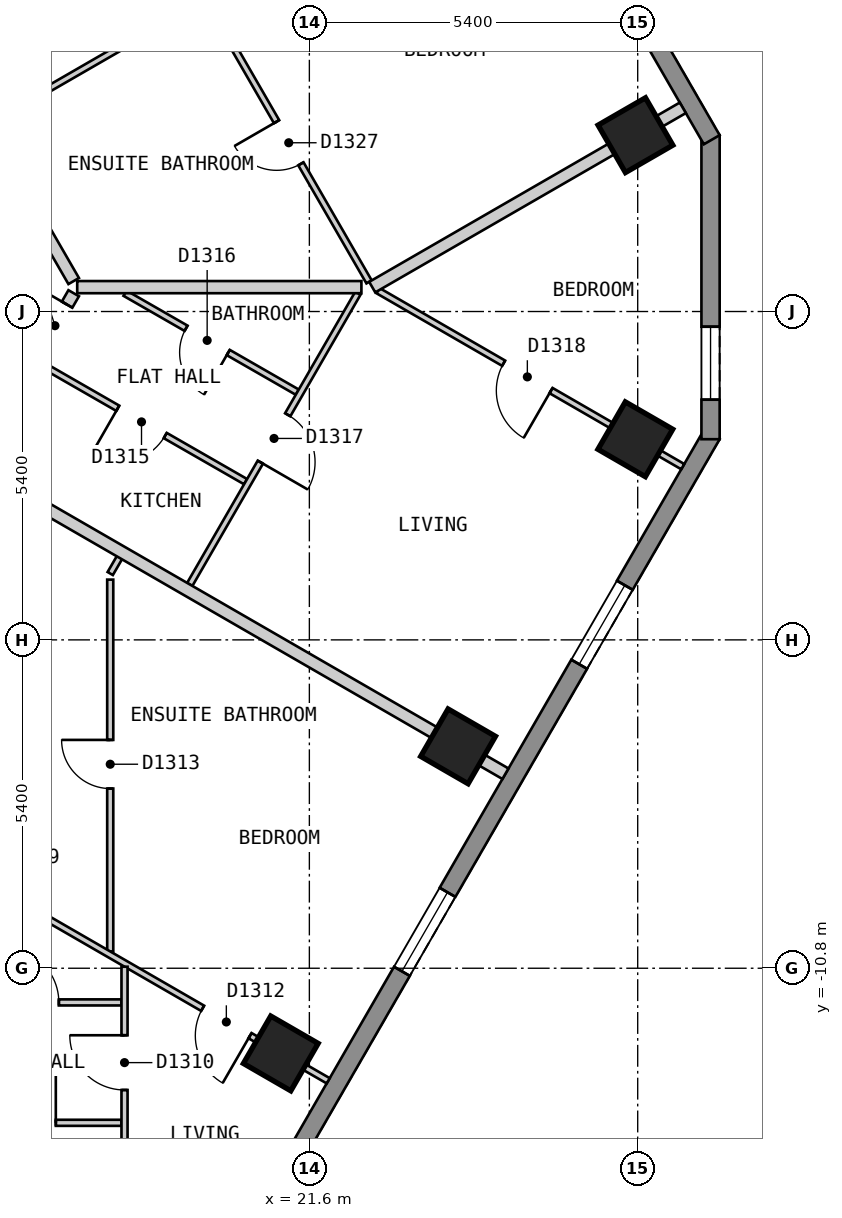
"""IFC4 building model, lengths in metres.
Left out: names, types, materials, properties, quantities, classifications, styles, units other than length and angle.
Written with IfcOpenShell. Run it as: python <this file> out.ifc"""

import sys

from ifc_helpers import new_model, si_unit, direction, frame, frame_2d, origin, origin_2d, place, context, subcontext, project, spatial, polyline, rectangle, outline, extrude, element, fill, save


model = new_model("IFC4")
c1 = context("Model", 3, precision=1e-05, world=origin(), true_north=direction((0.0, 1.0)))
c2 = subcontext(c1, "Body", "Model", "MODEL_VIEW")
j1 = project(units=[si_unit("LENGTHUNIT", "METRE"), si_unit("PLANEANGLEUNIT", "RADIAN")], contexts=[c1])
p1 = place(None, origin())
s1 = spatial("IfcSite", under=j1, at=p1, CompositionType="ELEMENT")
p2 = place(p1, origin())
s2 = spatial("IfcBuilding", under=s1, at=p2, CompositionType="ELEMENT")
p3 = place(p2, frame((0.0, 0.0, 135.6)))
s3 = spatial("IfcBuildingStorey", under=s2, at=p3, CompositionType="ELEMENT", Elevation=135.6)
for number, where, z_axis, x_axis in (
    (1, (21.13, -12.201, 0.0), (0.0, 0.0, 1.0), (0.5, 0.866, 0.0)),
    (2, (24.046, -7.151, 0.0), (0.0, 0.0, 1.0), (0.5, 0.866, 0.0)),
    (3, (26.961, -2.101, 0.0), (0.0, 0.0, 1.0), (0.5, 0.866, 0.0)),
    (4, (26.963, 2.9, 0.0), (0.0, 0.0, 1.0), (-0.5, 0.866, 0.0)),
):
    element("IfcColumn", number, at=place(p3, frame(where, z_axis=z_axis, x_axis=x_axis)), inside=s3, PredefinedType="COLUMN", context=c2, shape_type="SweptSolid", body=[
        extrude(rectangle(XDim=0.9, YDim=0.9, at=origin_2d()), origin(), (0.0, 0.0, 1.0), 3.0),
    ])
p4 = place(p3, frame((15.862, -23.425, 0.0), z_axis=(0.0, 0.0, 1.0), x_axis=(0.500017503135, 0.866015298109, 0.0)))
e5 = element("IfcWall", 5, at=p4, inside=s3, PredefinedType="SOLIDWALL", context=c2, shape_type="SweptSolid", body=[
    extrude(outline(polyline([(0.0, -0.15), (24.711, -0.15), (24.631, 0.15), (0.08, 0.15), (0.0, -0.15)])), origin(), (0.0, 0.0, 1.0), 2.7),
])
p5 = place(p4, frame((2.857, 0.0, 0.15)))
e6 = element("IfcOpeningElement", 6, at=p5, cuts=e5, PredefinedType="OPENING", context=c2, shape_type="SweptSolid", body=[
    extrude(rectangle(XDim=1.5, YDim=2.1, at=frame_2d((0.75, 1.05))), frame((0.0, 0.16, 0.0), z_axis=(0.0, -1.0, 0.0), x_axis=(1.0, 0.0, 0.0)), (0.0, 0.0, 1.0), 0.32),
])
p6 = place(p4, frame((8.689, 0.0, 0.15)))
e7 = element("IfcOpeningElement", 7, at=p6, cuts=e5, PredefinedType="OPENING", context=c2, shape_type="SweptSolid", body=[
    extrude(rectangle(XDim=1.5, YDim=2.1, at=frame_2d((0.75, 1.05))), frame((0.0, 0.16, 0.0), z_axis=(0.0, -1.0, 0.0), x_axis=(1.0, 0.0, 0.0)), (0.0, 0.0, 1.0), 0.32),
])
p7 = place(p4, frame((14.52, 0.0, 0.15)))
e8 = element("IfcOpeningElement", 8, at=p7, cuts=e5, PredefinedType="OPENING", context=c2, shape_type="SweptSolid", body=[
    extrude(rectangle(XDim=1.5, YDim=2.1, at=frame_2d((0.75, 1.05))), frame((0.0, 0.16, 0.0), z_axis=(0.0, -1.0, 0.0), x_axis=(1.0, 0.0, 0.0)), (0.0, 0.0, 1.0), 0.32),
])
p8 = place(p4, frame((20.351, 0.0, 0.15)))
e9 = element("IfcOpeningElement", 9, at=p8, cuts=e5, PredefinedType="OPENING", context=c2, shape_type="SweptSolid", body=[
    extrude(rectangle(XDim=1.5, YDim=2.1, at=frame_2d((0.75, 1.05))), frame((0.0, 0.16, 0.0), z_axis=(0.0, -1.0, 0.0), x_axis=(1.0, 0.0, 0.0)), (0.0, 0.0, 1.0), 0.32),
])
p9 = place(p3, frame((28.198, -2.1, 0.0), z_axis=(0.0, 0.0, 1.0), x_axis=(0.0, 1.0, 0.0)))
e10 = element("IfcWall", 10, at=p9, inside=s3, PredefinedType="SOLIDWALL", context=c2, shape_type="SweptSolid", body=[
    extrude(outline(polyline([(0.0, -0.15), (5.0, -0.15), (4.92, 0.15), (0.08, 0.15), (0.0, -0.15)])), origin(), (0.0, 0.0, 1.0), 2.7),
])
p10 = place(p9, frame((0.65, 0.0, 0.15)))
e11 = element("IfcOpeningElement", 11, at=p10, cuts=e10, PredefinedType="OPENING", context=c2, shape_type="SweptSolid", body=[
    extrude(rectangle(XDim=1.2, YDim=2.1, at=frame_2d((0.6, 1.05))), frame((0.0, 0.16, 0.0), z_axis=(0.0, -1.0, 0.0), x_axis=(1.0, 0.0, 0.0)), (0.0, 0.0, 1.0), 0.32),
])
p11 = place(p3, frame((28.218, 2.825, 0.0), z_axis=(0.0, 0.0, 1.0), x_axis=(-0.500020536353, 0.866013546791, 0.0)))
e12 = element("IfcWall", 12, at=p11, inside=s3, PredefinedType="SOLIDWALL", context=c2, shape_type="SweptSolid", body=[
    extrude(outline(polyline([(0.0, -0.15), (23.325, -0.15), (23.245, 0.15), (0.08, 0.15), (0.0, -0.15)])), origin(), (0.0, 0.0, 1.0), 2.7),
])
p12 = place(p11, frame((2.685, 0.0, 0.15)))
e13 = element("IfcOpeningElement", 13, at=p12, cuts=e12, PredefinedType="OPENING", context=c2, shape_type="SweptSolid", body=[
    extrude(rectangle(XDim=1.5, YDim=2.1, at=frame_2d((0.75, 1.05))), frame((0.0, 0.16, 0.0), z_axis=(0.0, -1.0, 0.0), x_axis=(1.0, 0.0, 0.0)), (0.0, 0.0, 1.0), 0.32),
])
p13 = place(p11, frame((8.17, 0.0, 0.15)))
e14 = element("IfcOpeningElement", 14, at=p13, cuts=e12, PredefinedType="OPENING", context=c2, shape_type="SweptSolid", body=[
    extrude(rectangle(XDim=1.5, YDim=2.1, at=frame_2d((0.75, 1.05))), frame((0.0, 0.16, 0.0), z_axis=(0.0, -1.0, 0.0), x_axis=(1.0, 0.0, 0.0)), (0.0, 0.0, 1.0), 0.32),
])
p14 = place(p11, frame((13.655, 0.0, 0.15)))
e15 = element("IfcOpeningElement", 15, at=p14, cuts=e12, PredefinedType="OPENING", context=c2, shape_type="SweptSolid", body=[
    extrude(rectangle(XDim=1.5, YDim=2.1, at=frame_2d((0.75, 1.05))), frame((0.0, 0.16, 0.0), z_axis=(0.0, -1.0, 0.0), x_axis=(1.0, 0.0, 0.0)), (0.0, 0.0, 1.0), 0.32),
])
p15 = place(p11, frame((19.14, 0.0, 0.15)))
e16 = element("IfcOpeningElement", 16, at=p15, cuts=e12, PredefinedType="OPENING", context=c2, shape_type="SweptSolid", body=[
    extrude(rectangle(XDim=1.5, YDim=2.1, at=frame_2d((0.75, 1.05))), frame((0.0, 0.16, 0.0), z_axis=(0.0, -1.0, 0.0), x_axis=(1.0, 0.0, 0.0)), (0.0, 0.0, 1.0), 0.32),
])
p16 = place(p3, frame((9.296, 15.1, 0.0), z_axis=(0.0, 0.0, 1.0), x_axis=(0.499974024244, -0.866040400375, 0.0)))
e17 = element("IfcWall", 17, at=p16, inside=s3, PredefinedType="PARTITIONING", context=c2, shape_type="SweptSolid", body=[
    extrude(rectangle(XDim=16.857, YDim=0.2, at=frame_2d((8.429, 0.0))), origin(), (0.0, 0.0, 1.0), 2.7),
])
p17 = place(p16, frame((5.209, 0.0, 0.0)))
e18 = element("IfcOpeningElement", 18, at=p17, cuts=e17, PredefinedType="OPENING", context=c2, shape_type="SweptSolid", body=[
    extrude(rectangle(XDim=1.0, YDim=2.1, at=frame_2d((0.5, 1.05))), frame((0.0, 0.11, 0.0), z_axis=(0.0, -1.0, 0.0), x_axis=(1.0, 0.0, 0.0)), (0.0, 0.0, 1.0), 0.22),
])
p18 = place(p3, frame((15.5, -3.552, 0.0), z_axis=(0.0, 0.0, 1.0), x_axis=(0.499928303779, 0.86606679366, 0.0)))
e19 = element("IfcWall", 19, at=p18, inside=s3, PredefinedType="PARTITIONING", context=c2, shape_type="SweptSolid", body=[
    extrude(rectangle(XDim=4.449, YDim=0.2, at=frame_2d((2.225, 0.0))), origin(), (0.0, 0.0, 1.0), 2.7),
])
p19 = place(p18, frame((3.432, 0.0, 0.0)))
e20 = element("IfcOpeningElement", 20, at=p19, cuts=e19, PredefinedType="OPENING", context=c2, shape_type="SweptSolid", body=[
    extrude(rectangle(XDim=0.8, YDim=2.1, at=frame_2d((0.4, 1.05))), frame((0.0, 0.11, 0.0), z_axis=(0.0, -1.0, 0.0), x_axis=(1.0, 0.0, 0.0)), (0.0, 0.0, 1.0), 0.22),
])
p20 = place(p3, frame((11.713, 19.313, 0.0), z_axis=(0.0, 0.0, 1.0), x_axis=(0.499999523185, -0.866025679073, 0.0)))
e21 = element("IfcWall", 21, at=p20, inside=s3, PredefinedType="PARTITIONING", context=c2, shape_type="SweptSolid", body=[
    extrude(rectangle(XDim=21.738, YDim=0.1, at=frame_2d((10.869, 0.0))), origin(), (0.0, 0.0, 1.0), 2.7),
])
p21 = place(p20, frame((7.654, 0.0, 0.0)))
e22 = element("IfcOpeningElement", 22, at=p21, cuts=e21, PredefinedType="OPENING", context=c2, shape_type="SweptSolid", body=[
    extrude(rectangle(XDim=0.9, YDim=2.1, at=frame_2d((0.45, 1.05))), frame((0.0, 0.06, 0.0), z_axis=(0.0, -1.0, 0.0), x_axis=(1.0, 0.0, 0.0)), (0.0, 0.0, 1.0), 0.12),
])
p22 = place(p20, frame((13.202, 0.0, 0.0)))
e23 = element("IfcOpeningElement", 23, at=p22, cuts=e21, PredefinedType="OPENING", context=c2, shape_type="SweptSolid", body=[
    extrude(rectangle(XDim=0.8, YDim=2.1, at=frame_2d((0.4, 1.05))), frame((0.0, 0.06, 0.0), z_axis=(0.0, -1.0, 0.0), x_axis=(1.0, 0.0, 0.0)), (0.0, 0.0, 1.0), 0.12),
])
p23 = place(p20, frame((2.242, 0.0, 0.0)))
e24 = element("IfcOpeningElement", 24, at=p23, cuts=e21, PredefinedType="OPENING", context=c2, shape_type="SweptSolid", body=[
    extrude(rectangle(XDim=0.8, YDim=2.1, at=frame_2d((0.4, 1.05))), frame((0.0, 0.06, 0.0), z_axis=(0.0, -1.0, 0.0), x_axis=(1.0, 0.0, 0.0)), (0.0, 0.0, 1.0), 0.12),
])
p24 = place(p20, frame((18.696, 0.0, 0.0)))
e25 = element("IfcOpeningElement", 25, at=p24, cuts=e21, PredefinedType="OPENING", context=c2, shape_type="SweptSolid", body=[
    extrude(rectangle(XDim=0.8, YDim=2.1, at=frame_2d((0.4, 1.05))), frame((0.0, 0.06, 0.0), z_axis=(0.0, -1.0, 0.0), x_axis=(1.0, 0.0, 0.0)), (0.0, 0.0, 1.0), 0.12),
])
p25 = place(p3, frame((18.325, -4.409, 0.0), z_axis=(0.0, 0.0, 1.0), x_axis=(0.0, -1.0, 0.0)))
e26 = element("IfcWall", 26, at=p25, inside=s3, PredefinedType="PARTITIONING", context=c2, shape_type="SweptSolid", body=[
    extrude(rectangle(XDim=6.115, YDim=0.1, at=frame_2d((3.058, 0.0))), origin(), (0.0, 0.0, 1.0), 2.7),
])
p26 = place(p25, frame((2.636, 0.0, 0.0)))
e27 = element("IfcOpeningElement", 27, at=p26, cuts=e26, PredefinedType="OPENING", context=c2, shape_type="SweptSolid", body=[
    extrude(rectangle(XDim=0.8, YDim=2.1, at=frame_2d((0.4, 1.05))), frame((0.0, 0.06, 0.0), z_axis=(0.0, -1.0, 0.0), x_axis=(1.0, 0.0, 0.0)), (0.0, 0.0, 1.0), 0.12),
])
p27 = place(p3, frame((15.641, -9.032, 0.0), z_axis=(0.0, 0.0, 1.0), x_axis=(0.866049104564, -0.499958946799, 0.0)))
e28 = element("IfcWall", 28, at=p27, inside=s3, PredefinedType="PARTITIONING", context=c2, shape_type="SweptSolid", body=[
    extrude(rectangle(XDim=7.238, YDim=0.1, at=frame_2d((3.619, 0.0))), origin(), (0.0, 0.0, 1.0), 2.7),
])
p28 = place(p27, frame((4.854, 0.0, 0.0)))
e29 = element("IfcOpeningElement", 29, at=p28, cuts=e28, PredefinedType="OPENING", context=c2, shape_type="SweptSolid", body=[
    extrude(rectangle(XDim=0.9, YDim=2.1, at=frame_2d((0.45, 1.05))), frame((0.0, 0.06, 0.0), z_axis=(0.0, -1.0, 0.0), x_axis=(1.0, 0.0, 0.0)), (0.0, 0.0, 1.0), 0.12),
])
p29 = place(p3, frame((17.171, -0.857, 0.0), z_axis=(0.0, 0.0, 1.0), x_axis=(0.867173455867, -0.49800622229, 0.0)))
e30 = element("IfcWall", 30, at=p29, inside=s3, PredefinedType="PARTITIONING", context=c2, shape_type="SweptSolid", body=[
    extrude(rectangle(XDim=3.898, YDim=0.1, at=frame_2d((1.949, 0.0))), origin(), (0.0, 0.0, 1.0), 2.7),
])
p30 = place(p29, frame((1.474, 0.0, 0.0)))
e31 = element("IfcOpeningElement", 31, at=p30, cuts=e30, PredefinedType="OPENING", context=c2, shape_type="SweptSolid", body=[
    extrude(rectangle(XDim=0.9, YDim=2.1, at=frame_2d((0.45, 1.05))), frame((0.0, 0.06, 0.0), z_axis=(0.0, -1.0, 0.0), x_axis=(1.0, 0.0, 0.0)), (0.0, 0.0, 1.0), 0.12),
])
p31 = place(p3, frame((18.568, 0.301, 0.0), z_axis=(0.0, 0.0, 1.0), x_axis=(0.867155675456, -0.49803718187, 0.0)))
e32 = element("IfcWall", 32, at=p31, inside=s3, PredefinedType="PARTITIONING", context=c2, shape_type="SweptSolid", body=[
    extrude(rectangle(XDim=3.267, YDim=0.1, at=frame_2d((1.633, 0.0))), origin(), (0.0, 0.0, 1.0), 2.7),
])
p32 = place(p31, frame((1.158, 0.0, 0.0)))
e33 = element("IfcOpeningElement", 33, at=p32, cuts=e32, PredefinedType="OPENING", context=c2, shape_type="SweptSolid", body=[
    extrude(rectangle(XDim=0.8, YDim=2.1, at=frame_2d((0.4, 1.05))), frame((0.0, 0.06, 0.0), z_axis=(0.0, -1.0, 0.0), x_axis=(1.0, 0.0, 0.0)), (0.0, 0.0, 1.0), 0.12),
])
p33 = place(p3, frame((22.729, 0.343, 0.0), z_axis=(0.0, 0.0, 1.0), x_axis=(0.865996608848, -0.500049870977, 0.0)))
e34 = element("IfcWall", 34, at=p33, inside=s3, PredefinedType="PARTITIONING", context=c2, shape_type="SweptSolid", body=[
    extrude(rectangle(XDim=5.788, YDim=0.1, at=frame_2d((2.894, 0.0))), origin(), (0.0, 0.0, 1.0), 2.7),
])
p34 = place(p33, frame((2.386, 0.0, 0.0)))
e35 = element("IfcOpeningElement", 35, at=p34, cuts=e34, PredefinedType="OPENING", context=c2, shape_type="SweptSolid", body=[
    extrude(rectangle(XDim=0.9, YDim=2.1, at=frame_2d((0.45, 1.05))), frame((0.0, 0.06, 0.0), z_axis=(0.0, -1.0, 0.0), x_axis=(1.0, 0.0, 0.0)), (0.0, 0.0, 1.0), 0.12),
])
p35 = place(p3, frame((15.6, -11.362, 0.0), z_axis=(0.0, 0.0, 1.0), x_axis=(1.0, 0.0, 0.0)))
e36 = element("IfcWall", 36, at=p35, inside=s3, PredefinedType="PARTITIONING", context=c2, shape_type="SweptSolid", body=[
    extrude(rectangle(XDim=2.91, YDim=0.1, at=frame_2d((1.455, 0.0))), origin(), (0.0, 0.0, 1.0), 2.7),
])
p36 = place(p35, frame((0.98, 0.0, 0.0)))
e37 = element("IfcOpeningElement", 37, at=p36, cuts=e36, PredefinedType="OPENING", context=c2, shape_type="SweptSolid", body=[
    extrude(rectangle(XDim=0.9, YDim=2.1, at=frame_2d((0.45, 1.05))), frame((0.0, 0.06, 0.0), z_axis=(0.0, -1.0, 0.0), x_axis=(1.0, 0.0, 0.0)), (0.0, 0.0, 1.0), 0.12),
])
p37 = place(p3, frame((15.6, -13.342, 0.0), z_axis=(0.0, 0.0, 1.0), x_axis=(1.0, 0.0, 0.0)))
e38 = element("IfcWall", 38, at=p37, inside=s3, PredefinedType="PARTITIONING", context=c2, shape_type="SweptSolid", body=[
    extrude(rectangle(XDim=2.91, YDim=0.1, at=frame_2d((1.455, 0.0))), origin(), (0.0, 0.0, 1.0), 2.7),
])
p38 = place(p37, frame((1.03, 0.0, 0.0)))
e39 = element("IfcOpeningElement", 39, at=p38, cuts=e38, PredefinedType="OPENING", context=c2, shape_type="SweptSolid", body=[
    extrude(rectangle(XDim=0.8, YDim=2.1, at=frame_2d((0.4, 1.05))), frame((0.0, 0.06, 0.0), z_axis=(0.0, -1.0, 0.0), x_axis=(1.0, 0.0, 0.0)), (0.0, 0.0, 1.0), 0.12),
])
p39 = place(p3, frame((18.325, -4.309, 0.0), z_axis=(0.0, 0.0, 1.0), x_axis=(0.5014706583, 0.865174652232, 0.0)))
e40 = element("IfcWall", 40, at=p39, inside=s3, PredefinedType="PARTITIONING", context=c2, shape_type="SweptSolid", body=[
    extrude(rectangle(XDim=0.399, YDim=0.1, at=frame_2d((0.199, 0.0))), origin(), (0.0, 0.0, 1.0), 2.7),
])
p40 = place(p3, frame((19.633, -4.488, 0.0), z_axis=(0.0, 0.0, 1.0), x_axis=(0.499989971015, 0.866031193944, 0.0)))
e41 = element("IfcWall", 41, at=p40, inside=s3, PredefinedType="PARTITIONING", context=c2, shape_type="SweptSolid", body=[
    extrude(rectangle(XDim=5.53, YDim=0.1, at=frame_2d((2.765, 0.0))), origin(), (0.0, 0.0, 1.0), 2.7),
])
p41 = place(p40, frame((2.322, 0.0, 0.0)))
e42 = element("IfcOpeningElement", 42, at=p41, cuts=e41, PredefinedType="OPENING", context=c2, shape_type="SweptSolid", body=[
    extrude(rectangle(XDim=0.9, YDim=2.1, at=frame_2d((0.45, 1.05))), frame((0.0, 0.06, 0.0), z_axis=(0.0, -1.0, 0.0), x_axis=(1.0, 0.0, 0.0)), (0.0, 0.0, 1.0), 0.12),
])
p42 = place(p3, frame((18.56, -15.652, 0.0), z_axis=(0.0, 0.0, 1.0), x_axis=(0.0, 1.0, 0.0)))
e43 = element("IfcWall", 43, at=p42, inside=s3, PredefinedType="PARTITIONING", context=c2, shape_type="SweptSolid", body=[
    extrude(rectangle(XDim=4.877, YDim=0.1, at=frame_2d((2.438, 0.0))), origin(), (0.0, 0.0, 1.0), 2.7),
])
p43 = place(p42, frame((2.85, 0.0, 0.0)))
e44 = element("IfcOpeningElement", 44, at=p43, cuts=e43, PredefinedType="OPENING", context=c2, shape_type="SweptSolid", body=[
    extrude(rectangle(XDim=0.9, YDim=2.1, at=frame_2d((0.45, 1.05))), frame((0.0, 0.06, 0.0), z_axis=(0.0, -1.0, 0.0), x_axis=(1.0, 0.0, 0.0)), (0.0, 0.0, 1.0), 0.12),
])
p44 = place(p3, frame((16.339, 3.1, 0.0), z_axis=(0.0, 0.0, 1.0), x_axis=(0.866050731258, 0.499956128963, 0.0)))
e45 = element("IfcWall", 45, at=p44, inside=s3, PredefinedType="PARTITIONING", context=c2, shape_type="SweptSolid", body=[
    extrude(rectangle(XDim=4.1, YDim=0.1, at=frame_2d((2.05, 0.0))), origin(), (0.0, 0.0, 1.0), 2.7),
])
p45 = place(p3, frame((16.165, -2.601, 0.0), z_axis=(0.0, 0.0, 1.0), x_axis=(0.866016855193, -0.500014806302, 0.0)))
e46 = element("IfcWall", 46, at=p45, inside=s3, PredefinedType="PARTITIONING", context=c2, shape_type="SweptSolid", body=[
    extrude(rectangle(XDim=10.0, YDim=0.2, at=frame_2d((5.0, 0.0))), origin(), (0.0, 0.0, 1.0), 2.7),
])
p46 = place(p3, frame((17.782, 0.401, 0.0), z_axis=(0.0, 0.0, 1.0), x_axis=(1.0, 0.0, 0.0)))
e47 = element("IfcWall", 47, at=p46, inside=s3, PredefinedType="PARTITIONING", context=c2, shape_type="SweptSolid", body=[
    extrude(rectangle(XDim=4.674, YDim=0.2, at=frame_2d((2.337, 0.0))), origin(), (0.0, 0.0, 1.0), 2.7),
])
p47 = place(p3, frame((22.634, 0.401, 0.0), z_axis=(0.0, 0.0, 1.0), x_axis=(0.86601325737, 0.500021037617, 0.0)))
e48 = element("IfcWall", 48, at=p47, inside=s3, PredefinedType="PARTITIONING", context=c2, shape_type="SweptSolid", body=[
    extrude(rectangle(XDim=5.898, YDim=0.2, at=frame_2d((2.949, 0.0))), origin(), (0.0, 0.0, 1.0), 2.7),
])
p48 = place(p7, origin())
e49 = element("IfcWindow", 49, at=p48, inside=s3, PartitioningType="SINGLE_PANEL", PredefinedType="WINDOW", context=c2, shape_type="SweptSolid", body=[
    extrude(rectangle(XDim=1.5, YDim=2.1, at=frame_2d((0.75, 1.05))), frame((0.0, 0.03, 0.0), z_axis=(0.0, -1.0, 0.0), x_axis=(1.0, 0.0, 0.0)), (0.0, 0.0, 1.0), 0.06),
])
fill(e8, e49)
p49 = place(p8, origin())
e50 = element("IfcWindow", 50, at=p49, inside=s3, PartitioningType="SINGLE_PANEL", PredefinedType="WINDOW", context=c2, shape_type="SweptSolid", body=[
    extrude(rectangle(XDim=1.5, YDim=2.1, at=frame_2d((0.75, 1.05))), frame((0.0, 0.03, 0.0), z_axis=(0.0, -1.0, 0.0), x_axis=(1.0, 0.0, 0.0)), (0.0, 0.0, 1.0), 0.06),
])
fill(e9, e50)
p50 = place(p10, origin())
e51 = element("IfcWindow", 51, at=p50, inside=s3, PartitioningType="SINGLE_PANEL", PredefinedType="WINDOW", context=c2, shape_type="SweptSolid", body=[
    extrude(rectangle(XDim=1.2, YDim=2.1, at=frame_2d((0.6, 1.05))), frame((0.0, 0.03, 0.0), z_axis=(0.0, -1.0, 0.0), x_axis=(1.0, 0.0, 0.0)), (0.0, 0.0, 1.0), 0.06),
])
fill(e11, e51)
p51 = place(p38, origin())
e52 = element("IfcDoor", 52, at=p51, inside=s3, OperationType="SINGLE_SWING_RIGHT", PredefinedType="DOOR", context=c2, shape_type="SweptSolid", body=[
    extrude(rectangle(XDim=0.8, YDim=2.1, at=frame_2d((0.4, 1.05))), frame((0.0, 0.025, 0.0), z_axis=(0.0, -1.0, 0.0), x_axis=(1.0, 0.0, 0.0)), (0.0, 0.0, 1.0), 0.05),
])
fill(e39, e52)
p52 = place(p36, origin())
e53 = element("IfcDoor", 53, at=p52, inside=s3, OperationType="SINGLE_SWING_LEFT", PredefinedType="DOOR", context=c2, shape_type="SweptSolid", body=[
    extrude(rectangle(XDim=0.9, YDim=2.1, at=frame_2d((0.45, 1.05))), frame((0.0, 0.025, 0.0), z_axis=(0.0, -1.0, 0.0), x_axis=(1.0, 0.0, 0.0)), (0.0, 0.0, 1.0), 0.05),
])
fill(e37, e53)
p53 = place(p43, origin())
e54 = element("IfcDoor", 54, at=p53, inside=s3, OperationType="SINGLE_SWING_RIGHT", PredefinedType="DOOR", context=c2, shape_type="SweptSolid", body=[
    extrude(rectangle(XDim=0.9, YDim=2.1, at=frame_2d((0.45, 1.05))), frame((0.0, 0.025, 0.0), z_axis=(0.0, -1.0, 0.0), x_axis=(1.0, 0.0, 0.0)), (0.0, 0.0, 1.0), 0.05),
])
fill(e44, e54)
p54 = place(p28, origin())
e55 = element("IfcDoor", 55, at=p54, inside=s3, OperationType="SINGLE_SWING_RIGHT", PredefinedType="DOOR", context=c2, shape_type="SweptSolid", body=[
    extrude(rectangle(XDim=0.9, YDim=2.1, at=frame_2d((0.45, 1.05))), frame((0.0, 0.025, 0.0), z_axis=(0.0, -1.0, 0.0), x_axis=(1.0, 0.0, 0.0)), (0.0, 0.0, 1.0), 0.05),
])
fill(e29, e55)
p55 = place(p26, origin())
e56 = element("IfcDoor", 56, at=p55, inside=s3, OperationType="SINGLE_SWING_LEFT", PredefinedType="DOOR", context=c2, shape_type="SweptSolid", body=[
    extrude(rectangle(XDim=0.8, YDim=2.1, at=frame_2d((0.4, 1.05))), frame((0.0, 0.025, 0.0), z_axis=(0.0, -1.0, 0.0), x_axis=(1.0, 0.0, 0.0)), (0.0, 0.0, 1.0), 0.05),
])
fill(e27, e56)
p56 = place(p19, origin())
e57 = element("IfcDoor", 57, at=p56, inside=s3, OperationType="SINGLE_SWING_RIGHT", PredefinedType="DOOR", context=c2, shape_type="SweptSolid", body=[
    extrude(rectangle(XDim=0.8, YDim=2.1, at=frame_2d((0.4, 1.05))), frame((0.0, 0.025, 0.0), z_axis=(0.0, -1.0, 0.0), x_axis=(1.0, 0.0, 0.0)), (0.0, 0.0, 1.0), 0.05),
])
fill(e20, e57)
p57 = place(p30, origin())
e58 = element("IfcDoor", 58, at=p57, inside=s3, OperationType="SINGLE_SWING_LEFT", PredefinedType="DOOR", context=c2, shape_type="SweptSolid", body=[
    extrude(rectangle(XDim=0.9, YDim=2.1, at=frame_2d((0.45, 1.05))), frame((0.0, 0.025, 0.0), z_axis=(0.0, -1.0, 0.0), x_axis=(1.0, 0.0, 0.0)), (0.0, 0.0, 1.0), 0.05),
])
fill(e31, e58)
p58 = place(p32, origin())
e59 = element("IfcDoor", 59, at=p58, inside=s3, OperationType="SINGLE_SWING_RIGHT", PredefinedType="DOOR", context=c2, shape_type="SweptSolid", body=[
    extrude(rectangle(XDim=0.8, YDim=2.1, at=frame_2d((0.4, 1.05))), frame((0.0, 0.025, 0.0), z_axis=(0.0, -1.0, 0.0), x_axis=(1.0, 0.0, 0.0)), (0.0, 0.0, 1.0), 0.05),
])
fill(e33, e59)
p59 = place(p41, origin())
e60 = element("IfcDoor", 60, at=p59, inside=s3, OperationType="SINGLE_SWING_LEFT", PredefinedType="DOOR", context=c2, shape_type="SweptSolid", body=[
    extrude(rectangle(XDim=0.9, YDim=2.1, at=frame_2d((0.45, 1.05))), frame((0.0, 0.025, 0.0), z_axis=(0.0, -1.0, 0.0), x_axis=(1.0, 0.0, 0.0)), (0.0, 0.0, 1.0), 0.05),
])
fill(e42, e60)
p60 = place(p34, origin())
e61 = element("IfcDoor", 61, at=p60, inside=s3, OperationType="SINGLE_SWING_RIGHT", PredefinedType="DOOR", context=c2, shape_type="SweptSolid", body=[
    extrude(rectangle(XDim=0.9, YDim=2.1, at=frame_2d((0.45, 1.05))), frame((0.0, 0.025, 0.0), z_axis=(0.0, -1.0, 0.0), x_axis=(1.0, 0.0, 0.0)), (0.0, 0.0, 1.0), 0.05),
])
fill(e35, e61)
p61 = place(p24, origin())
e62 = element("IfcDoor", 62, at=p61, inside=s3, OperationType="SINGLE_SWING_LEFT", PredefinedType="DOOR", context=c2, shape_type="SweptSolid", body=[
    extrude(rectangle(XDim=0.8, YDim=2.1, at=frame_2d((0.4, 1.05))), frame((0.0, 0.025, 0.0), z_axis=(0.0, -1.0, 0.0), x_axis=(1.0, 0.0, 0.0)), (0.0, 0.0, 1.0), 0.05),
])
fill(e25, e62)
save(model, sys.argv[1])
